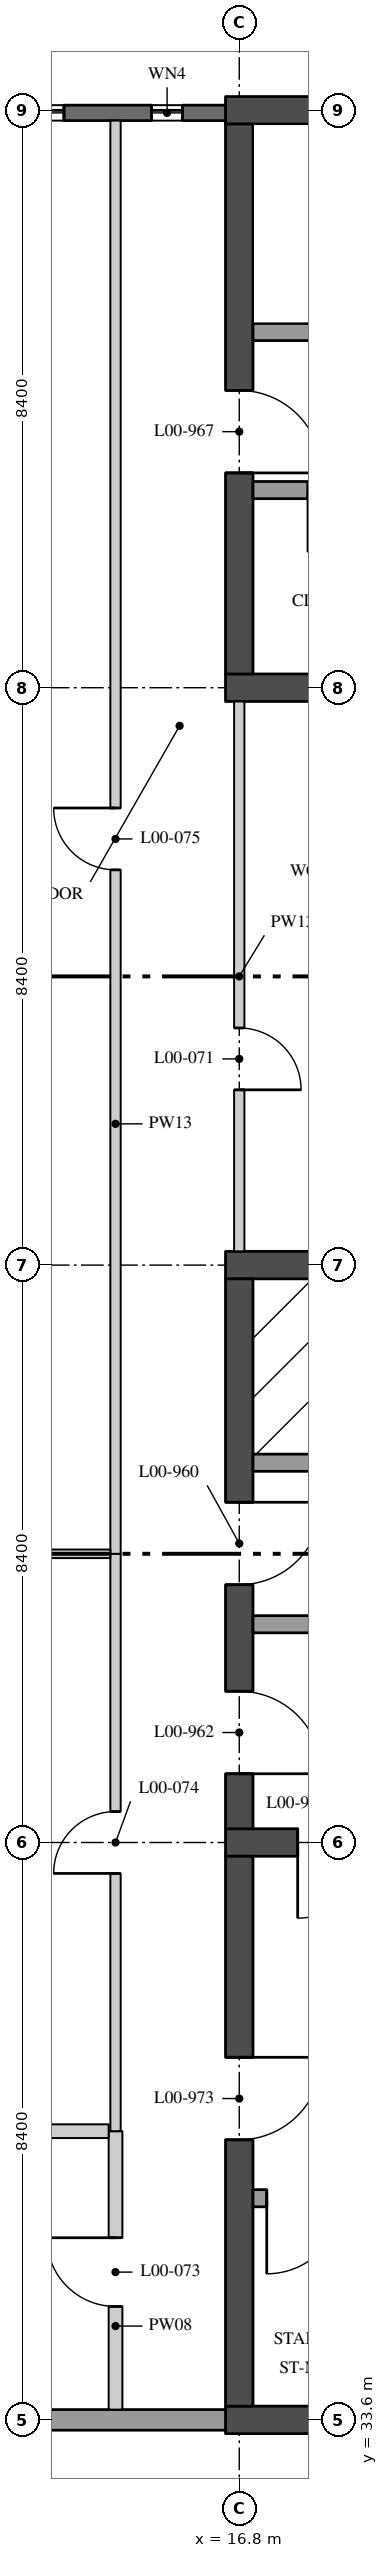
"""IFC4 building model, lengths in metres.
Left out: names, types, materials, properties, quantities, classifications, styles, units other than length and angle.
Written with IfcOpenShell. Run it as: python <this file> out.ifc"""

import sys

from ifc_helpers import new_model, si_unit, direction, frame, frame_2d, origin, place, context, subcontext, project, spatial, rectangle, extrude, element, fill, save


model = new_model("IFC4")
c1 = context("Model", 3, precision=1e-05, world=origin(), true_north=direction((0.0, 1.0)))
c2 = subcontext(c1, "Body", "Model", "MODEL_VIEW")
j1 = project(units=[si_unit("LENGTHUNIT", "METRE"), si_unit("PLANEANGLEUNIT", "RADIAN")], contexts=[c1])
p1 = place(None, origin())
s1 = spatial("IfcSite", under=j1, at=p1, CompositionType="ELEMENT")
p2 = place(p1, origin())
s2 = spatial("IfcBuilding", under=s1, at=p2, CompositionType="ELEMENT")
p3 = place(p2, origin())
s3 = spatial("IfcBuildingStorey", under=s2, at=p3, CompositionType="ELEMENT", Elevation=0.0)
p4 = place(p3, frame((16.6, 42.0, 0.0), z_axis=(0.0, 0.0, 1.0), x_axis=(1.0, 0.0, 0.0)))
e1 = element("IfcWall", 1, at=p4, inside=s3, PredefinedType="SHEAR", context=c2, shape_type="SweptSolid", body=[
    extrude(rectangle(XDim=8.8, YDim=0.4, at=frame_2d((4.4, 0.0))), origin(), (0.0, 0.0, 1.0), 5.05),
])
p5 = place(p4, frame((1.05, 0.0, 0.0)))
e2 = element("IfcOpeningElement", 2, at=p5, cuts=e1, PredefinedType="OPENING", context=c2, shape_type="SweptSolid", body=[
    extrude(rectangle(XDim=1.1, YDim=2.1, at=frame_2d((0.55, 1.05))), frame((0.0, 0.21, 0.0), z_axis=(0.0, -1.0, 0.0), x_axis=(1.0, 0.0, 0.0)), (0.0, 0.0, 1.0), 0.42),
])
p6 = place(p3, frame((16.6, 50.4, 0.0), z_axis=(0.0, 0.0, 1.0), x_axis=(1.0, 0.0, 0.0)))
e3 = element("IfcWall", 3, at=p6, inside=s3, PredefinedType="SHEAR", context=c2, shape_type="SweptSolid", body=[
    extrude(rectangle(XDim=8.8, YDim=0.4, at=frame_2d((4.4, 0.0))), origin(), (0.0, 0.0, 1.0), 5.05),
])
p7 = place(p3, frame((16.8, 42.2, 0.0), z_axis=(0.0, 0.0, 1.0), x_axis=(0.0, 1.0, 0.0)))
e4 = element("IfcWall", 4, at=p7, inside=s3, PredefinedType="SHEAR", context=c2, shape_type="SweptSolid", body=[
    extrude(rectangle(XDim=8.0, YDim=0.4, at=frame_2d((4.0, 0.0))), origin(), (0.0, 0.0, 1.0), 5.05),
])
p8 = place(p7, frame((3.55, 0.0, 0.0)))
e5 = element("IfcOpeningElement", 5, at=p8, cuts=e4, PredefinedType="OPENING", context=c2, shape_type="SweptSolid", body=[
    extrude(rectangle(XDim=1.2, YDim=2.1, at=frame_2d((0.6, 1.05))), frame((0.0, 0.21, 0.0), z_axis=(0.0, -1.0, 0.0), x_axis=(1.0, 0.0, 0.0)), (0.0, 0.0, 1.0), 0.42),
])
p9 = place(p7, frame((0.8, 0.0, 0.0)))
e6 = element("IfcOpeningElement", 6, at=p9, cuts=e4, PredefinedType="OPENING", context=c2, shape_type="SweptSolid", body=[
    extrude(rectangle(XDim=1.2, YDim=2.1, at=frame_2d((0.6, 1.05))), frame((0.0, 0.21, 0.0), z_axis=(0.0, -1.0, 0.0), x_axis=(1.0, 0.0, 0.0)), (0.0, 0.0, 1.0), 0.42),
])
p10 = place(p3, frame((21.7, 47.525, 0.0), z_axis=(0.0, 0.0, 1.0), x_axis=(-1.0, 0.0, 0.0)))
e7 = element("IfcWall", 7, at=p10, inside=s3, PredefinedType="SOLIDWALL", context=c2, shape_type="SweptSolid", body=[
    extrude(rectangle(XDim=4.7, YDim=0.25, at=frame_2d((2.35, 0.0))), origin(), (0.0, 0.0, 1.0), 5.05),
])
p11 = place(p10, frame((1.9, 0.0, 0.0)))
e8 = element("IfcOpeningElement", 8, at=p11, cuts=e7, PredefinedType="OPENING", context=c2, shape_type="SweptSolid", body=[
    extrude(rectangle(XDim=0.9, YDim=2.1, at=frame_2d((0.45, 1.05))), frame((0.0, 0.135, 0.0), z_axis=(0.0, -1.0, 0.0), x_axis=(1.0, 0.0, 0.0)), (0.0, 0.0, 1.0), 0.27),
])
p12 = place(p3, frame((19.65, 45.175, 0.0), z_axis=(0.0, 0.0, 1.0), x_axis=(-1.0, 0.0, 0.0)))
e9 = element("IfcWall", 9, at=p12, inside=s3, PredefinedType="SOLIDWALL", context=c2, shape_type="SweptSolid", body=[
    extrude(rectangle(XDim=2.65, YDim=0.25, at=frame_2d((1.325, 0.0))), origin(), (0.0, 0.0, 1.0), 5.05),
])
p13 = place(p3, frame((16.6, 58.8, 0.0), z_axis=(0.0, 0.0, 1.0), x_axis=(1.0, 0.0, 0.0)))
e10 = element("IfcWall", 10, at=p13, inside=s3, PredefinedType="SHEAR", context=c2, shape_type="SweptSolid", body=[
    extrude(rectangle(XDim=8.8, YDim=0.4, at=frame_2d((4.4, 0.0))), origin(), (0.0, 0.0, 1.0), 5.05),
])
p14 = place(p3, frame((16.6, 67.2, 0.0), z_axis=(0.0, 0.0, 1.0), x_axis=(1.0, 0.0, 0.0)))
e11 = element("IfcWall", 11, at=p14, inside=s3, PredefinedType="SHEAR", context=c2, shape_type="SweptSolid", body=[
    extrude(rectangle(XDim=8.8, YDim=0.4, at=frame_2d((4.4, 0.0))), origin(), (0.0, 0.0, 1.0), 5.05),
])
p15 = place(p14, frame((7.05, 0.0, 0.0)))
e12 = element("IfcOpeningElement", 12, at=p15, cuts=e11, PredefinedType="OPENING", context=c2, shape_type="SweptSolid", body=[
    extrude(rectangle(XDim=1.2, YDim=2.1, at=frame_2d((0.6, 1.05))), frame((0.0, 0.21, 0.0), z_axis=(0.0, -1.0, 0.0), x_axis=(1.0, 0.0, 0.0)), (0.0, 0.0, 1.0), 0.42),
])
p16 = place(p3, frame((16.8, 59.0, 0.0), z_axis=(0.0, 0.0, 1.0), x_axis=(0.0, 1.0, 0.0)))
e13 = element("IfcWall", 13, at=p16, inside=s3, PredefinedType="SHEAR", context=c2, shape_type="SweptSolid", body=[
    extrude(rectangle(XDim=8.0, YDim=0.4, at=frame_2d((4.0, 0.0))), origin(), (0.0, 0.0, 1.0), 5.05),
])
p17 = place(p16, frame((2.925, 0.0, 0.0)))
e14 = element("IfcOpeningElement", 14, at=p17, cuts=e13, PredefinedType="OPENING", context=c2, shape_type="SweptSolid", body=[
    extrude(rectangle(XDim=1.2, YDim=2.1, at=frame_2d((0.6, 1.05))), frame((0.0, 0.21, 0.0), z_axis=(0.0, -1.0, 0.0), x_axis=(1.0, 0.0, 0.0)), (0.0, 0.0, 1.0), 0.42),
])
p18 = place(p3, frame((25.0, 63.975, 0.0), z_axis=(0.0, 0.0, 1.0), x_axis=(-1.0, 0.0, 0.0)))
e15 = element("IfcWall", 15, at=p18, inside=s3, PredefinedType="SOLIDWALL", context=c2, shape_type="SweptSolid", body=[
    extrude(rectangle(XDim=8.0, YDim=0.25, at=frame_2d((4.0, 0.0))), origin(), (0.0, 0.0, 1.0), 5.05),
])
p19 = place(p18, frame((0.2, 0.0, 0.0)))
e16 = element("IfcOpeningElement", 16, at=p19, cuts=e15, PredefinedType="OPENING", context=c2, shape_type="SweptSolid", body=[
    extrude(rectangle(XDim=1.1, YDim=2.1, at=frame_2d((0.55, 1.05))), frame((0.0, 0.135, 0.0), z_axis=(0.0, -1.0, 0.0), x_axis=(1.0, 0.0, 0.0)), (0.0, 0.0, 1.0), 0.27),
])
p20 = place(p3, frame((22.35, 61.675, 0.0), z_axis=(0.0, 0.0, 1.0), x_axis=(-1.0, 0.0, 0.0)))
e17 = element("IfcWall", 17, at=p20, inside=s3, PredefinedType="SOLIDWALL", context=c2, shape_type="SweptSolid", body=[
    extrude(rectangle(XDim=5.35, YDim=0.25, at=frame_2d((2.675, 0.0))), origin(), (0.0, 0.0, 1.0), 5.05),
])
p21 = place(p20, frame((3.65, 0.0, 0.0)))
e18 = element("IfcOpeningElement", 18, at=p21, cuts=e17, PredefinedType="OPENING", context=c2, shape_type="SweptSolid", body=[
    extrude(rectangle(XDim=0.9, YDim=2.1, at=frame_2d((0.45, 1.05))), frame((0.0, 0.135, 0.0), z_axis=(0.0, -1.0, 0.0), x_axis=(1.0, 0.0, 0.0)), (0.0, 0.0, 1.0), 0.27),
])
p22 = place(p20, frame((0.9, 0.0, 0.0)))
e19 = element("IfcOpeningElement", 19, at=p22, cuts=e17, PredefinedType="OPENING", context=c2, shape_type="SweptSolid", body=[
    extrude(rectangle(XDim=0.8, YDim=2.1, at=frame_2d((0.4, 1.05))), frame((0.0, 0.135, 0.0), z_axis=(0.0, -1.0, 0.0), x_axis=(1.0, 0.0, 0.0)), (0.0, 0.0, 1.0), 0.27),
])
p23 = place(p3, frame((16.6, 33.6, 0.0), z_axis=(0.0, 0.0, 1.0), x_axis=(1.0, 0.0, 0.0)))
e20 = element("IfcWall", 20, at=p23, inside=s3, PredefinedType="SHEAR", context=c2, shape_type="SweptSolid", body=[
    extrude(rectangle(XDim=8.8, YDim=0.4, at=frame_2d((4.4, 0.0))), origin(), (0.0, 0.0, 1.0), 5.05),
])
p24 = place(p3, frame((16.8, 33.8, 0.0), z_axis=(0.0, 0.0, 1.0), x_axis=(0.0, 1.0, 0.0)))
e21 = element("IfcWall", 21, at=p24, inside=s3, PredefinedType="SHEAR", context=c2, shape_type="SweptSolid", body=[
    extrude(rectangle(XDim=8.0, YDim=0.4, at=frame_2d((4.0, 0.0))), origin(), (0.0, 0.0, 1.0), 5.05),
])
p25 = place(p24, frame((3.875, 0.0, 0.0)))
e22 = element("IfcOpeningElement", 22, at=p25, cuts=e21, PredefinedType="OPENING", context=c2, shape_type="SweptSolid", body=[
    extrude(rectangle(XDim=1.2, YDim=2.1, at=frame_2d((0.6, 1.05))), frame((0.0, 0.21, 0.0), z_axis=(0.0, -1.0, 0.0), x_axis=(1.0, 0.0, 0.0)), (0.0, 0.0, 1.0), 0.42),
])
p26 = place(p3, frame((17.0, 36.825, 0.0), z_axis=(0.0, 0.0, 1.0), x_axis=(1.0, 0.0, 0.0)))
e23 = element("IfcWall", 23, at=p26, inside=s3, PredefinedType="SOLIDWALL", context=c2, shape_type="SweptSolid", body=[
    extrude(rectangle(XDim=8.0, YDim=0.25, at=frame_2d((4.0, 0.0))), origin(), (0.0, 0.0, 1.0), 5.05),
])
p27 = place(p26, frame((0.2, 0.0, 0.0)))
e24 = element("IfcOpeningElement", 24, at=p27, cuts=e23, PredefinedType="OPENING", context=c2, shape_type="SweptSolid", body=[
    extrude(rectangle(XDim=1.1, YDim=2.1, at=frame_2d((0.55, 1.05))), frame((0.0, 0.135, 0.0), z_axis=(0.0, -1.0, 0.0), x_axis=(1.0, 0.0, 0.0)), (0.0, 0.0, 1.0), 0.27),
])
p28 = place(p3, frame((16.8, 50.6, 0.0), z_axis=(0.0, 0.0, 1.0), x_axis=(0.0, 1.0, 0.0)))
e25 = element("IfcWall", 25, at=p28, inside=s3, PredefinedType="PARTITIONING", context=c2, shape_type="SweptSolid", body=[
    extrude(rectangle(XDim=8.0, YDim=0.15, at=frame_2d((4.0, 0.0))), origin(), (0.0, 0.0, 1.0), 5.05),
])
p29 = place(p28, frame((2.35, 0.0, 0.0)))
e26 = element("IfcOpeningElement", 26, at=p29, cuts=e25, PredefinedType="OPENING", context=c2, shape_type="SweptSolid", body=[
    extrude(rectangle(XDim=0.9, YDim=2.1, at=frame_2d((0.45, 1.05))), frame((0.0, 0.085, 0.0), z_axis=(0.0, -1.0, 0.0), x_axis=(1.0, 0.0, 0.0)), (0.0, 0.0, 1.0), 0.17),
])
p30 = place(p3, frame((15.0, 33.75, 0.0), z_axis=(0.0, 0.0, 1.0), x_axis=(0.0, 1.0, 0.0)))
e27 = element("IfcWall", 27, at=p30, inside=s3, PredefinedType="PARTITIONING", context=c2, shape_type="SweptSolid", body=[
    extrude(rectangle(XDim=4.05, YDim=0.2, at=frame_2d((2.025, 0.0))), origin(), (0.0, 0.0, 1.0), 5.05),
])
p31 = place(p30, frame((1.5, 0.0, 0.0)))
e28 = element("IfcOpeningElement", 28, at=p31, cuts=e27, PredefinedType="OPENING", context=c2, shape_type="SweptSolid", body=[
    extrude(rectangle(XDim=1.0, YDim=2.4, at=frame_2d((0.5, 1.2))), frame((0.0, 0.11, 0.0), z_axis=(0.0, -1.0, 0.0), x_axis=(1.0, 0.0, 0.0)), (0.0, 0.0, 1.0), 0.22),
])
p32 = place(p3, frame((15.0, 37.8, 0.0), z_axis=(0.0, 0.0, 1.0), x_axis=(0.0, 1.0, 0.0)))
e29 = element("IfcWall", 29, at=p32, inside=s3, PredefinedType="PARTITIONING", context=c2, shape_type="SweptSolid", body=[
    extrude(rectangle(XDim=8.4, YDim=0.15, at=frame_2d((4.2, 0.0))), origin(), (0.0, 0.0, 1.0), 5.05),
])
p33 = place(p32, frame((3.75, 0.0, 0.0)))
e30 = element("IfcOpeningElement", 30, at=p33, cuts=e29, PredefinedType="OPENING", context=c2, shape_type="SweptSolid", body=[
    extrude(rectangle(XDim=0.9, YDim=2.1, at=frame_2d((0.45, 1.05))), frame((0.0, 0.085, 0.0), z_axis=(0.0, -1.0, 0.0), x_axis=(1.0, 0.0, 0.0)), (0.0, 0.0, 1.0), 0.17),
])
p34 = place(p3, frame((15.0, 46.2, 0.0), z_axis=(0.0, 0.0, 1.0), x_axis=(0.0, 1.0, 0.0)))
e31 = element("IfcWall", 31, at=p34, inside=s3, PredefinedType="PARTITIONING", context=c2, shape_type="SweptSolid", body=[
    extrude(rectangle(XDim=20.85, YDim=0.15, at=frame_2d((10.425, 0.0))), origin(), (0.0, 0.0, 1.0), 5.05),
])
p35 = place(p34, frame((9.95, 0.0, 0.0)))
e32 = element("IfcOpeningElement", 32, at=p35, cuts=e31, PredefinedType="OPENING", context=c2, shape_type="SweptSolid", body=[
    extrude(rectangle(XDim=0.9, YDim=2.1, at=frame_2d((0.45, 1.05))), frame((0.0, 0.085, 0.0), z_axis=(0.0, -1.0, 0.0), x_axis=(1.0, 0.0, 0.0)), (0.0, 0.0, 1.0), 0.17),
])
p36 = place(p3, frame((8.55, 37.8, 0.0), z_axis=(0.0, 0.0, 1.0), x_axis=(1.0, 0.0, 0.0)))
e33 = element("IfcWall", 33, at=p36, inside=s3, PredefinedType="PARTITIONING", context=c2, shape_type="SweptSolid", body=[
    extrude(rectangle(XDim=6.35, YDim=0.2, at=frame_2d((3.175, 0.0))), origin(), (0.0, 0.0, 1.0), 5.05),
])
p37 = place(p3, frame((8.55, 46.2, 0.0), z_axis=(0.0, 0.0, 1.0), x_axis=(1.0, 0.0, 0.0)))
e34 = element("IfcWall", 34, at=p37, inside=s3, PredefinedType="PARTITIONING", context=c2, shape_type="SweptSolid", body=[
    extrude(rectangle(XDim=6.375, YDim=0.125, at=frame_2d((3.188, 0.0))), origin(), (0.0, 0.0, 1.0), 5.05),
])
p38 = place(p3, frame((16.6, 67.163, 0.0), z_axis=(0.0, 0.0, 1.0), x_axis=(-1.0, 0.0, 0.0)))
e35 = element("IfcWall", 35, at=p38, inside=s3, PredefinedType="SOLIDWALL", context=c2, shape_type="SweptSolid", body=[
    extrude(rectangle(XDim=7.77, YDim=0.225, at=frame_2d((3.885, 0.0))), origin(), (0.0, 0.0, 1.0), 5.05),
])
p39 = place(p38, frame((0.625, 0.0, 1.2)))
e36 = element("IfcOpeningElement", 36, at=p39, cuts=e35, PredefinedType="OPENING", context=c2, shape_type="SweptSolid", body=[
    extrude(rectangle(XDim=0.45, YDim=2.85, at=frame_2d((0.225, 1.425))), frame((0.0, 0.123, 0.0), z_axis=(0.0, -1.0, 0.0), x_axis=(1.0, 0.0, 0.0)), (0.0, 0.0, 1.0), 0.245),
])
p40 = place(p38, frame((2.35, 0.0, 1.2)))
e37 = element("IfcOpeningElement", 37, at=p40, cuts=e35, PredefinedType="OPENING", context=c2, shape_type="SweptSolid", body=[
    extrude(rectangle(XDim=1.2, YDim=2.85, at=frame_2d((0.6, 1.425))), frame((0.0, 0.123, 0.0), z_axis=(0.0, -1.0, 0.0), x_axis=(1.0, 0.0, 0.0)), (0.0, 0.0, 1.0), 0.245),
])
p41 = place(p38, frame((4.825, 0.0, 1.2)))
e38 = element("IfcOpeningElement", 38, at=p41, cuts=e35, PredefinedType="OPENING", context=c2, shape_type="SweptSolid", body=[
    extrude(rectangle(XDim=0.45, YDim=2.85, at=frame_2d((0.225, 1.425))), frame((0.0, 0.123, 0.0), z_axis=(0.0, -1.0, 0.0), x_axis=(1.0, 0.0, 0.0)), (0.0, 0.0, 1.0), 0.245),
])
p42 = place(p3, frame((16.6, 33.6, 0.0), z_axis=(0.0, 0.0, 1.0), x_axis=(-1.0, 0.0, 0.0)))
e39 = element("IfcWall", 39, at=p42, inside=s3, PredefinedType="SOLIDWALL", context=c2, shape_type="SweptSolid", body=[
    extrude(rectangle(XDim=7.77, YDim=0.3, at=frame_2d((3.885, 0.0))), origin(), (0.0, 0.0, 1.0), 5.05),
])
p43 = place(p8, frame((1.2, 0.0, 0.0), z_axis=(0.0, 0.0, 1.0), x_axis=(-1.0, 0.0, 0.0)))
e40 = element("IfcDoor", 40, at=p43, inside=s3, OperationType="SINGLE_SWING_RIGHT", PredefinedType="DOOR", context=c2, shape_type="SweptSolid", body=[
    extrude(rectangle(XDim=1.2, YDim=2.1, at=frame_2d((0.6, 1.05))), frame((0.0, 0.035, 0.0), z_axis=(0.0, -1.0, 0.0), x_axis=(1.0, 0.0, 0.0)), (0.0, 0.0, 1.0), 0.07),
])
fill(e5, e40)
p44 = place(p9, frame((1.2, 0.0, 0.0), z_axis=(0.0, 0.0, 1.0), x_axis=(-1.0, 0.0, 0.0)))
e41 = element("IfcDoor", 41, at=p44, inside=s3, OperationType="SINGLE_SWING_LEFT", PredefinedType="DOOR", context=c2, shape_type="SweptSolid", body=[
    extrude(rectangle(XDim=1.2, YDim=2.1, at=frame_2d((0.6, 1.05))), frame((0.0, 0.035, 0.0), z_axis=(0.0, -1.0, 0.0), x_axis=(1.0, 0.0, 0.0)), (0.0, 0.0, 1.0), 0.07),
])
fill(e6, e41)
p45 = place(p5, frame((1.1, 0.0, 0.0), z_axis=(0.0, 0.0, 1.0), x_axis=(-1.0, 0.0, 0.0)))
e42 = element("IfcDoor", 42, at=p45, inside=s3, OperationType="SINGLE_SWING_LEFT", PredefinedType="DOOR", context=c2, shape_type="SweptSolid", body=[
    extrude(rectangle(XDim=1.1, YDim=2.1, at=frame_2d((0.55, 1.05))), frame((0.0, 0.035, 0.0), z_axis=(0.0, -1.0, 0.0), x_axis=(1.0, 0.0, 0.0)), (0.0, 0.0, 1.0), 0.07),
])
fill(e2, e42)
p46 = place(p17, frame((1.2, 0.0, 0.0), z_axis=(0.0, 0.0, 1.0), x_axis=(-1.0, 0.0, 0.0)))
e43 = element("IfcDoor", 43, at=p46, inside=s3, OperationType="SINGLE_SWING_LEFT", PredefinedType="DOOR", context=c2, shape_type="SweptSolid", body=[
    extrude(rectangle(XDim=1.2, YDim=2.1, at=frame_2d((0.6, 1.05))), frame((0.0, 0.035, 0.0), z_axis=(0.0, -1.0, 0.0), x_axis=(1.0, 0.0, 0.0)), (0.0, 0.0, 1.0), 0.07),
])
fill(e14, e43)
p47 = place(p25, frame((1.2, 0.0, 0.0), z_axis=(0.0, 0.0, 1.0), x_axis=(-1.0, 0.0, 0.0)))
e44 = element("IfcDoor", 44, at=p47, inside=s3, OperationType="SINGLE_SWING_RIGHT", PredefinedType="DOOR", context=c2, shape_type="SweptSolid", body=[
    extrude(rectangle(XDim=1.2, YDim=2.1, at=frame_2d((0.6, 1.05))), frame((0.0, 0.035, 0.0), z_axis=(0.0, -1.0, 0.0), x_axis=(1.0, 0.0, 0.0)), (0.0, 0.0, 1.0), 0.07),
])
fill(e22, e44)
p48 = place(p27, frame((1.1, 0.0, 0.0), z_axis=(0.0, 0.0, 1.0), x_axis=(-1.0, 0.0, 0.0)))
e45 = element("IfcDoor", 45, at=p48, inside=s3, OperationType="SINGLE_SWING_LEFT", PredefinedType="DOOR", context=c2, shape_type="SweptSolid", body=[
    extrude(rectangle(XDim=1.1, YDim=2.1, at=frame_2d((0.55, 1.05))), frame((0.0, 0.035, 0.0), z_axis=(0.0, -1.0, 0.0), x_axis=(1.0, 0.0, 0.0)), (0.0, 0.0, 1.0), 0.07),
])
fill(e24, e45)
p49 = place(p29, frame((0.9, 0.0, 0.0), z_axis=(0.0, 0.0, 1.0), x_axis=(-1.0, 0.0, 0.0)))
e46 = element("IfcDoor", 46, at=p49, inside=s3, OperationType="SINGLE_SWING_LEFT", PredefinedType="DOOR", context=c2, shape_type="SweptSolid", body=[
    extrude(rectangle(XDim=0.9, YDim=2.1, at=frame_2d((0.45, 1.05))), frame((0.0, 0.025, 0.0), z_axis=(0.0, -1.0, 0.0), x_axis=(1.0, 0.0, 0.0)), (0.0, 0.0, 1.0), 0.05),
])
fill(e26, e46)
p50 = place(p31, origin())
e47 = element("IfcDoor", 47, at=p50, inside=s3, OperationType="SINGLE_SWING_LEFT", PredefinedType="DOOR", context=c2, shape_type="SweptSolid", body=[
    extrude(rectangle(XDim=1.0, YDim=2.4, at=frame_2d((0.5, 1.2))), frame((0.0, 0.03, 0.0), z_axis=(0.0, -1.0, 0.0), x_axis=(1.0, 0.0, 0.0)), (0.0, 0.0, 1.0), 0.06),
])
fill(e28, e47)
p51 = place(p33, origin())
e48 = element("IfcDoor", 48, at=p51, inside=s3, OperationType="SINGLE_SWING_RIGHT", PredefinedType="DOOR", context=c2, shape_type="SweptSolid", body=[
    extrude(rectangle(XDim=0.9, YDim=2.1, at=frame_2d((0.45, 1.05))), frame((0.0, 0.025, 0.0), z_axis=(0.0, -1.0, 0.0), x_axis=(1.0, 0.0, 0.0)), (0.0, 0.0, 1.0), 0.05),
])
fill(e30, e48)
p52 = place(p35, origin())
e49 = element("IfcDoor", 49, at=p52, inside=s3, OperationType="SINGLE_SWING_LEFT", PredefinedType="DOOR", context=c2, shape_type="SweptSolid", body=[
    extrude(rectangle(XDim=0.9, YDim=2.1, at=frame_2d((0.45, 1.05))), frame((0.0, 0.025, 0.0), z_axis=(0.0, -1.0, 0.0), x_axis=(1.0, 0.0, 0.0)), (0.0, 0.0, 1.0), 0.05),
])
fill(e32, e49)
p53 = place(p39, origin())
e50 = element("IfcWindow", 50, at=p53, inside=s3, PartitioningType="SINGLE_PANEL", PredefinedType="WINDOW", context=c2, shape_type="SweptSolid", body=[
    extrude(rectangle(XDim=0.45, YDim=2.85, at=frame_2d((0.225, 1.425))), frame((0.0, 0.05, 0.0), z_axis=(0.0, -1.0, 0.0), x_axis=(1.0, 0.0, 0.0)), (0.0, 0.0, 1.0), 0.1),
])
fill(e36, e50)
p54 = place(p40, origin())
e51 = element("IfcWindow", 51, at=p54, inside=s3, PartitioningType="SINGLE_PANEL", PredefinedType="WINDOW", context=c2, shape_type="SweptSolid", body=[
    extrude(rectangle(XDim=1.2, YDim=2.85, at=frame_2d((0.6, 1.425))), frame((0.0, 0.05, 0.0), z_axis=(0.0, -1.0, 0.0), x_axis=(1.0, 0.0, 0.0)), (0.0, 0.0, 1.0), 0.1),
])
fill(e37, e51)
save(model, sys.argv[1])
